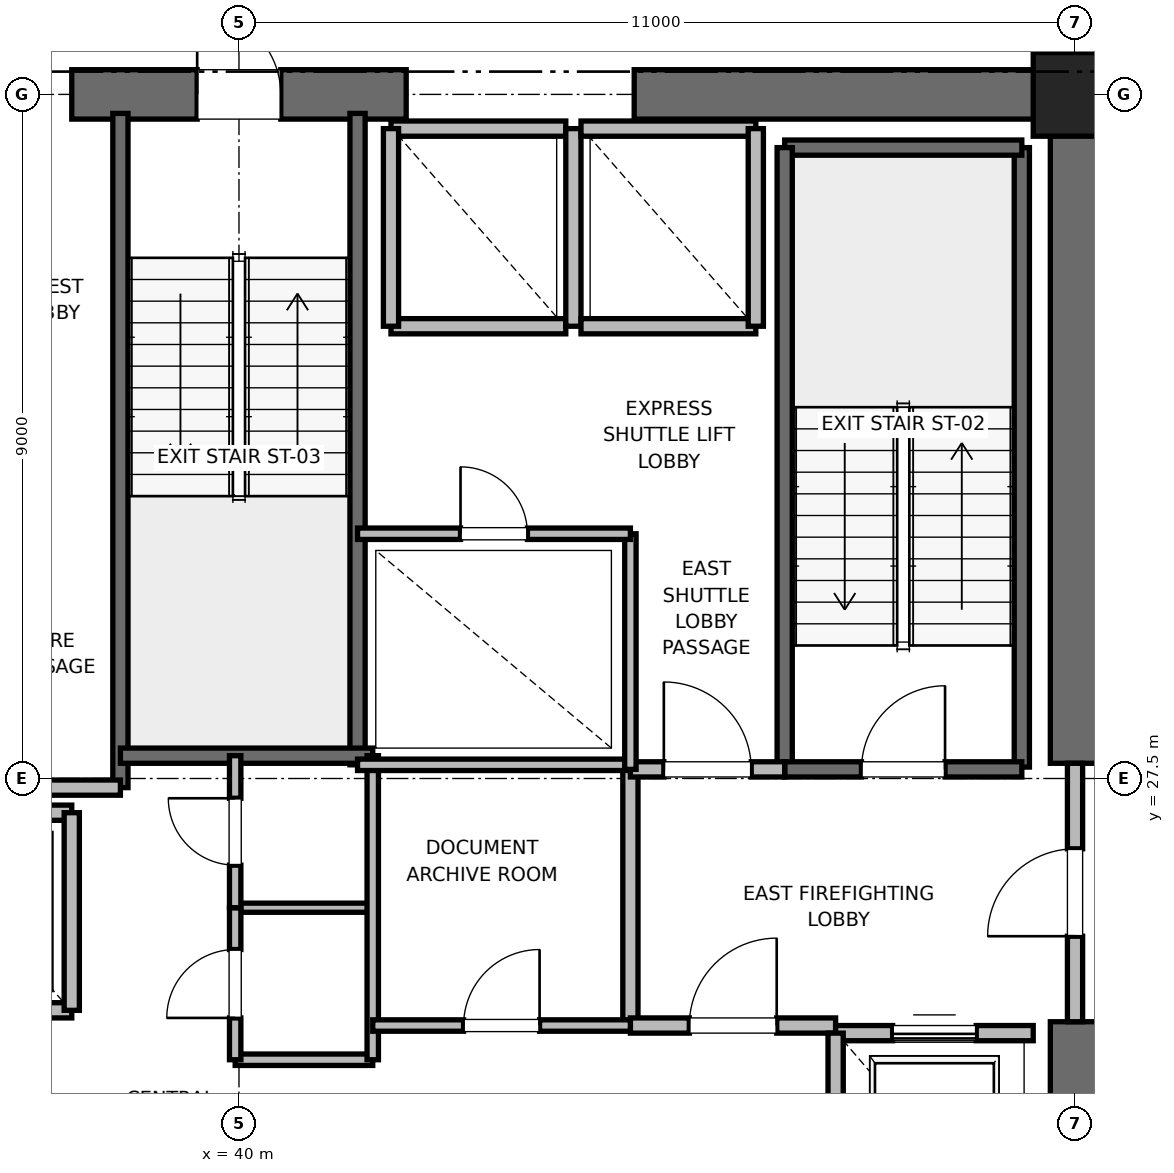
"""IFC4 building model, lengths in metres.
Left out: names, types, materials, properties, quantities, classifications, styles, units other than length and angle.
Written with IfcOpenShell. Run it as: python <this file> out.ifc"""

import sys

from ifc_helpers import new_model, si_unit, direction, frame, frame_2d, origin, origin_2d, place, context, subcontext, project, spatial, rectangle, extrude, element, fill, save


model = new_model("IFC4")
c1 = context("Model", 3, precision=1e-05, world=origin(), true_north=direction((0.0, 1.0)))
c2 = subcontext(c1, "Body", "Model", "MODEL_VIEW")
j1 = project(units=[si_unit("LENGTHUNIT", "METRE"), si_unit("PLANEANGLEUNIT", "RADIAN")], contexts=[c1])
p1 = place(None, origin())
s1 = spatial("IfcSite", under=j1, at=p1, CompositionType="ELEMENT")
p2 = place(p1, origin())
s2 = spatial("IfcBuilding", under=s1, at=p2, CompositionType="ELEMENT")
p3 = place(p2, frame((0.0, 0.0, 31.6)))
s3 = spatial("IfcBuildingStorey", under=s2, at=p3, CompositionType="ELEMENT", Elevation=31.6)
p4 = place(p3, frame((51.0, 36.5, 0.0), z_axis=(0.0, 0.0, 1.0), x_axis=(1.0, 0.0, 0.0)))
e1 = element("IfcColumn", 1, at=p4, inside=s3, PredefinedType="PILASTER", context=c2, shape_type="SweptSolid", body=[
    extrude(rectangle(XDim=1.1, YDim=1.1, at=origin_2d()), origin(), (0.0, 0.0, 1.0), 4.0),
])
p5 = place(p3, frame((37.8, 36.5, 0.0), z_axis=(0.0, 0.0, 1.0), x_axis=(1.0, 0.0, 0.0)))
e2 = element("IfcWall", 2, at=p5, inside=s3, PredefinedType="SHEAR", context=c2, shape_type="SweptSolid", body=[
    extrude(rectangle(XDim=4.4, YDim=0.65, at=frame_2d((2.2, 0.0))), origin(), (0.0, 0.0, 1.0), 3.76),
])
p6 = place(p5, frame((1.65, 0.0, 0.0)))
e3 = element("IfcOpeningElement", 3, at=p6, cuts=e2, PredefinedType="OPENING", context=c2, shape_type="SweptSolid", body=[
    extrude(rectangle(XDim=1.1, YDim=2.15, at=frame_2d((0.55, 1.075))), frame((0.0, 0.325, 0.0), z_axis=(0.0, -1.0, 0.0), x_axis=(1.0, 0.0, 0.0)), (0.0, 0.0, 1.0), 0.65),
])
for number, where, z_axis, x_axis in (
    (4, (45.2, 36.5, 0.0), (0.0, 0.0, 1.0), (1.0, 0.0, 0.0)),
    (5, (51.0, 18.5, 0.0), (0.0, 0.0, 1.0), (0.0, 1.0, 0.0)),
):
    element("IfcWall", number, at=place(p3, frame(where, z_axis=z_axis, x_axis=x_axis)), inside=s3, PredefinedType="SHEAR", context=c2, shape_type="SweptSolid", body=[
        extrude(rectangle(XDim=5.8, YDim=0.65, at=frame_2d((2.9, 0.0))), origin(), (0.0, 0.0, 1.0), 3.76),
    ])
p7 = place(p3, frame((51.0, 27.7, 0.0), z_axis=(0.0, 0.0, 1.0), x_axis=(0.0, 1.0, 0.0)))
e6 = element("IfcWall", 6, at=p7, inside=s3, PredefinedType="SHEAR", context=c2, shape_type="SweptSolid", body=[
    extrude(rectangle(XDim=8.8, YDim=0.65, at=frame_2d((4.4, 0.0))), origin(), (0.0, 0.0, 1.0), 3.76),
])
p8 = place(p3, frame((50.3, 27.65, 0.0), z_axis=(0.0, 0.0, 1.0), x_axis=(0.0, 1.0, 0.0)))
e7 = element("IfcWall", 7, at=p8, inside=s3, PredefinedType="SOLIDWALL", context=c2, shape_type="SweptSolid", body=[
    extrude(rectangle(XDim=8.15, YDim=0.2, at=frame_2d((4.075, 0.0))), origin(), (0.0, 0.0, 1.0), 3.76),
])
p9 = place(p3, frame((47.18, 35.8, 0.0), z_axis=(0.0, 0.0, 1.0), x_axis=(1.0, 0.0, 0.0)))
e8 = element("IfcWall", 8, at=p9, inside=s3, PredefinedType="SOLIDWALL", context=c2, shape_type="SweptSolid", body=[
    extrude(rectangle(XDim=3.12, YDim=0.2, at=frame_2d((1.56, 0.0))), origin(), (0.0, 0.0, 1.0), 3.76),
])
p10 = place(p3, frame((47.18, 27.62, 0.0), z_axis=(0.0, 0.0, 1.0), x_axis=(0.0, 1.0, 0.0)))
e9 = element("IfcWall", 9, at=p10, inside=s3, PredefinedType="SOLIDWALL", context=c2, shape_type="SweptSolid", body=[
    extrude(rectangle(XDim=8.18, YDim=0.2, at=frame_2d((4.09, 0.0))), origin(), (0.0, 0.0, 1.0), 3.76),
])
p11 = place(p3, frame((47.18, 27.62, 0.0), z_axis=(0.0, 0.0, 1.0), x_axis=(1.0, 0.0, 0.0)))
e10 = element("IfcWall", 10, at=p11, inside=s3, PredefinedType="SOLIDWALL", context=c2, shape_type="SweptSolid", body=[
    extrude(rectangle(XDim=3.12, YDim=0.2, at=frame_2d((1.56, 0.0))), origin(), (0.0, 0.0, 1.0), 3.76),
])
p12 = place(p11, frame((1.01, 0.0, 0.0)))
e11 = element("IfcOpeningElement", 11, at=p12, cuts=e10, PredefinedType="OPENING", context=c2, shape_type="SweptSolid", body=[
    extrude(rectangle(XDim=1.1, YDim=2.15, at=frame_2d((0.55, 1.075))), frame((0.0, 0.1, 0.0), z_axis=(0.0, -1.0, 0.0), x_axis=(1.0, 0.0, 0.0)), (0.0, 0.0, 1.0), 0.2),
])
p13 = place(p3, frame((38.44, 27.38, 0.0), z_axis=(0.0, 0.0, 1.0), x_axis=(0.0, 1.0, 0.0)))
e12 = element("IfcWall", 12, at=p13, inside=s3, PredefinedType="SOLIDWALL", context=c2, shape_type="SweptSolid", body=[
    extrude(rectangle(XDim=8.87, YDim=0.2, at=frame_2d((4.435, 0.0))), origin(), (0.0, 0.0, 1.0), 3.76),
])
p14 = place(p3, frame((41.56, 27.68, 0.0), z_axis=(0.0, 0.0, 1.0), x_axis=(0.0, 1.0, 0.0)))
e13 = element("IfcWall", 13, at=p14, inside=s3, PredefinedType="SOLIDWALL", context=c2, shape_type="SweptSolid", body=[
    extrude(rectangle(XDim=8.57, YDim=0.2, at=frame_2d((4.285, 0.0))), origin(), (0.0, 0.0, 1.0), 3.76),
])
p15 = place(p3, frame((38.44, 27.8, 0.0), z_axis=(0.0, 0.0, 1.0), x_axis=(1.0, 0.0, 0.0)))
e14 = element("IfcWall", 14, at=p15, inside=s3, PredefinedType="SOLIDWALL", context=c2, shape_type="SweptSolid", body=[
    extrude(rectangle(XDim=3.32, YDim=0.2, at=frame_2d((1.66, 0.0))), origin(), (0.0, 0.0, 1.0), 3.76),
])
p16 = place(p3, frame((32.82, 27.38, 0.0), z_axis=(0.0, 0.0, 1.0), x_axis=(1.0, 0.0, 0.0)))
e15 = element("IfcWall", 15, at=p16, inside=s3, PredefinedType="PARTITIONING", context=c2, shape_type="SweptSolid", body=[
    extrude(rectangle(XDim=5.62, YDim=0.2, at=frame_2d((2.81, 0.0))), origin(), (0.0, 0.0, 1.0), 3.76),
])
p17 = place(p3, frame((45.15, 24.25, 0.0), z_axis=(0.0, 0.0, 1.0), x_axis=(0.0, 1.0, 0.0)))
e16 = element("IfcWall", 16, at=p17, inside=s3, PredefinedType="PARTITIONING", context=c2, shape_type="SweptSolid", body=[
    extrude(rectangle(XDim=3.37, YDim=0.2, at=frame_2d((1.685, 0.0))), origin(), (0.0, 0.0, 1.0), 3.76),
])
p18 = place(p3, frame((45.15, 24.25, 0.0), z_axis=(0.0, 0.0, 1.0), x_axis=(1.0, 0.0, 0.0)))
e17 = element("IfcWall", 17, at=p18, inside=s3, PredefinedType="PARTITIONING", context=c2, shape_type="SweptSolid", body=[
    extrude(rectangle(XDim=2.7, YDim=0.2, at=frame_2d((1.35, 0.0))), origin(), (0.0, 0.0, 1.0), 3.76),
])
p19 = place(p18, frame((0.775, 0.0, 0.0)))
e18 = element("IfcOpeningElement", 18, at=p19, cuts=e17, PredefinedType="OPENING", context=c2, shape_type="SweptSolid", body=[
    extrude(rectangle(XDim=1.15, YDim=2.2, at=frame_2d((0.575, 1.1))), frame((0.0, 0.1, 0.0), z_axis=(0.0, -1.0, 0.0), x_axis=(1.0, 0.0, 0.0)), (0.0, 0.0, 1.0), 0.2),
])
p20 = place(p3, frame((45.15, 27.62, 0.0), z_axis=(0.0, 0.0, 1.0), x_axis=(1.0, 0.0, 0.0)))
e19 = element("IfcWall", 19, at=p20, inside=s3, PredefinedType="PARTITIONING", context=c2, shape_type="SweptSolid", body=[
    extrude(rectangle(XDim=2.03, YDim=0.2, at=frame_2d((1.015, 0.0))), origin(), (0.0, 0.0, 1.0), 3.76),
])
p21 = place(p20, frame((0.44, 0.0, 0.0)))
e20 = element("IfcOpeningElement", 20, at=p21, cuts=e19, PredefinedType="OPENING", context=c2, shape_type="SweptSolid", body=[
    extrude(rectangle(XDim=1.15, YDim=2.2, at=frame_2d((0.575, 1.1))), frame((0.0, 0.1, 0.0), z_axis=(0.0, -1.0, 0.0), x_axis=(1.0, 0.0, 0.0)), (0.0, 0.0, 1.0), 0.2),
])
p22 = place(p3, frame((51.0, 24.3, 0.0), z_axis=(0.0, 0.0, 1.0), x_axis=(0.0, 1.0, 0.0)))
e21 = element("IfcWall", 21, at=p22, inside=s3, PredefinedType="PARTITIONING", context=c2, shape_type="SweptSolid", body=[
    extrude(rectangle(XDim=3.4, YDim=0.2, at=frame_2d((1.7, 0.0))), origin(), (0.0, 0.0, 1.0), 2.54),
])
p23 = place(p22, frame((1.125, 0.0, 0.0)))
e22 = element("IfcOpeningElement", 22, at=p23, cuts=e21, PredefinedType="OPENING", context=c2, shape_type="SweptSolid", body=[
    extrude(rectangle(XDim=1.15, YDim=2.2, at=frame_2d((0.575, 1.1))), frame((0.0, 0.1, 0.0), z_axis=(0.0, -1.0, 0.0), x_axis=(1.0, 0.0, 0.0)), (0.0, 0.0, 1.0), 0.2),
])
p24 = place(p3, frame((50.45, 24.15, 0.0), z_axis=(0.0, 0.0, 1.0), x_axis=(-1.0, 0.0, 0.0)))
e23 = element("IfcWall", 23, at=p24, inside=s3, PredefinedType="SOLIDWALL", context=c2, shape_type="SweptSolid", body=[
    extrude(rectangle(XDim=2.6, YDim=0.2, at=frame_2d((1.3, 0.0))), origin(), (0.0, 0.0, 1.0), 2.54),
])
p25 = place(p24, frame((0.75, 0.0, 0.0)))
e24 = element("IfcOpeningElement", 24, at=p25, cuts=e23, PredefinedType="OPENING", context=c2, shape_type="SweptSolid", body=[
    extrude(rectangle(XDim=1.1, YDim=2.2, at=frame_2d((0.55, 1.1))), frame((0.0, 0.1, 0.0), z_axis=(0.0, -1.0, 0.0), x_axis=(1.0, 0.0, 0.0)), (0.0, 0.0, 1.0), 0.2),
])
p26 = place(p3, frame((47.85, 24.15, 0.0), z_axis=(0.0, 0.0, 1.0), x_axis=(0.0, -1.0, 0.0)))
e25 = element("IfcWall", 25, at=p26, inside=s3, PredefinedType="SOLIDWALL", context=c2, shape_type="SweptSolid", body=[
    extrude(rectangle(XDim=3.0, YDim=0.2, at=frame_2d((1.5, 0.0))), origin(), (0.0, 0.0, 1.0), 3.76),
])
p27 = place(p3, frame((35.5, 24.45, 0.0), z_axis=(0.0, 0.0, 1.0), x_axis=(1.0, 0.0, 0.0)))
e26 = element("IfcWall", 26, at=p27, inside=s3, PredefinedType="SOLIDWALL", context=c2, shape_type="SweptSolid", body=[
    extrude(rectangle(XDim=2.3, YDim=0.2, at=frame_2d((1.15, 0.0))), origin(), (0.0, 0.0, 1.0), 3.76),
])
p28 = place(p27, frame((0.6, 0.0, 0.0)))
e27 = element("IfcOpeningElement", 27, at=p28, cuts=e26, PredefinedType="OPENING", context=c2, shape_type="SweptSolid", body=[
    extrude(rectangle(XDim=1.1, YDim=2.2, at=frame_2d((0.55, 1.1))), frame((0.0, 0.1, 0.0), z_axis=(0.0, -1.0, 0.0), x_axis=(1.0, 0.0, 0.0)), (0.0, 0.0, 1.0), 0.2),
])
p29 = place(p3, frame((37.8, 27.05, 0.0), z_axis=(0.0, 0.0, 1.0), x_axis=(-1.0, 0.0, 0.0)))
e28 = element("IfcWall", 28, at=p29, inside=s3, PredefinedType="SOLIDWALL", context=c2, shape_type="SweptSolid", body=[
    extrude(rectangle(XDim=2.3, YDim=0.2, at=frame_2d((1.15, 0.0))), origin(), (0.0, 0.0, 1.0), 3.76),
])
p30 = place(p3, frame((37.8, 24.45, 0.0), z_axis=(0.0, 0.0, 1.0), x_axis=(0.0, 1.0, 0.0)))
e29 = element("IfcWall", 29, at=p30, inside=s3, PredefinedType="SOLIDWALL", context=c2, shape_type="SweptSolid", body=[
    extrude(rectangle(XDim=2.6, YDim=0.2, at=frame_2d((1.3, 0.0))), origin(), (0.0, 0.0, 1.0), 3.76),
])
p31 = place(p3, frame((42.0, 33.45, 0.0), z_axis=(0.0, 0.0, 1.0), x_axis=(1.0, 0.0, 0.0)))
e30 = element("IfcWall", 30, at=p31, inside=s3, PredefinedType="SOLIDWALL", context=c2, shape_type="SweptSolid", body=[
    extrude(rectangle(XDim=2.3, YDim=0.2, at=frame_2d((1.15, 0.0))), origin(), (0.0, 0.0, 1.0), 3.76),
])
p32 = place(p3, frame((44.3, 36.05, 0.0), z_axis=(0.0, 0.0, 1.0), x_axis=(-1.0, 0.0, 0.0)))
e31 = element("IfcWall", 31, at=p32, inside=s3, PredefinedType="SOLIDWALL", context=c2, shape_type="SweptSolid", body=[
    extrude(rectangle(XDim=2.3, YDim=0.2, at=frame_2d((1.15, 0.0))), origin(), (0.0, 0.0, 1.0), 2.54),
])
for number, where, z_axis, x_axis in (
    (32, (42.0, 36.05, 0.0), (0.0, 0.0, 1.0), (0.0, -1.0, 0.0)),
    (33, (44.4, 33.45, 0.0), (0.0, 0.0, 1.0), (0.0, 1.0, 0.0)),
):
    element("IfcWall", number, at=place(p3, frame(where, z_axis=z_axis, x_axis=x_axis)), inside=s3, PredefinedType="SOLIDWALL", context=c2, shape_type="SweptSolid", body=[
        extrude(rectangle(XDim=2.6, YDim=0.2, at=frame_2d((1.3, 0.0))), origin(), (0.0, 0.0, 1.0), 2.54),
    ])
p33 = place(p3, frame((44.5, 33.45, 0.0), z_axis=(0.0, 0.0, 1.0), x_axis=(1.0, 0.0, 0.0)))
e34 = element("IfcWall", 34, at=p33, inside=s3, PredefinedType="SOLIDWALL", context=c2, shape_type="SweptSolid", body=[
    extrude(rectangle(XDim=2.3, YDim=0.2, at=frame_2d((1.15, 0.0))), origin(), (0.0, 0.0, 1.0), 3.76),
])
p34 = place(p3, frame((46.8, 36.05, 0.0), z_axis=(0.0, 0.0, 1.0), x_axis=(-1.0, 0.0, 0.0)))
e35 = element("IfcWall", 35, at=p34, inside=s3, PredefinedType="SOLIDWALL", context=c2, shape_type="SweptSolid", body=[
    extrude(rectangle(XDim=2.3, YDim=0.2, at=frame_2d((1.15, 0.0))), origin(), (0.0, 0.0, 1.0), 2.54),
])
p35 = place(p3, frame((46.8, 33.45, 0.0), z_axis=(0.0, 0.0, 1.0), x_axis=(0.0, 1.0, 0.0)))
e36 = element("IfcWall", 36, at=p35, inside=s3, PredefinedType="SOLIDWALL", context=c2, shape_type="SweptSolid", body=[
    extrude(rectangle(XDim=2.6, YDim=0.2, at=frame_2d((1.3, 0.0))), origin(), (0.0, 0.0, 1.0), 3.76),
])
p36 = place(p3, frame((39.95, 23.8, 0.0), z_axis=(0.0, 0.0, 1.0), x_axis=(1.0, 0.0, 0.0)))
e37 = element("IfcWall", 37, at=p36, inside=s3, PredefinedType="PARTITIONING", context=c2, shape_type="SweptSolid", body=[
    extrude(rectangle(XDim=1.81, YDim=0.15, at=frame_2d((0.905, 0.0))), origin(), (0.0, 0.0, 1.0), 2.85),
])
p37 = place(p3, frame((39.95, 25.8, 0.0), z_axis=(0.0, 0.0, 1.0), x_axis=(1.0, 0.0, 0.0)))
e38 = element("IfcWall", 38, at=p37, inside=s3, PredefinedType="PARTITIONING", context=c2, shape_type="SweptSolid", body=[
    extrude(rectangle(XDim=1.81, YDim=0.12, at=frame_2d((0.905, 0.0))), origin(), (0.0, 0.0, 1.0), 2.85),
])
p38 = place(p3, frame((41.76, 23.8, 0.0), z_axis=(0.0, 0.0, 1.0), x_axis=(0.0, 1.0, 0.0)))
e39 = element("IfcWall", 39, at=p38, inside=s3, PredefinedType="PARTITIONING", context=c2, shape_type="SweptSolid", body=[
    extrude(rectangle(XDim=4.0, YDim=0.15, at=frame_2d((2.0, 0.0))), origin(), (0.0, 0.0, 1.0), 2.85),
])
p39 = place(p3, frame((39.95, 23.8, 0.0), z_axis=(0.0, 0.0, 1.0), x_axis=(0.0, 1.0, 0.0)))
e40 = element("IfcWall", 40, at=p39, inside=s3, PredefinedType="PARTITIONING", context=c2, shape_type="SweptSolid", body=[
    extrude(rectangle(XDim=2.0, YDim=0.15, at=frame_2d((1.0, 0.0))), origin(), (0.0, 0.0, 1.0), 2.85),
])
p40 = place(p39, frame((0.55, 0.0, 0.0)))
e41 = element("IfcOpeningElement", 41, at=p40, cuts=e40, PredefinedType="OPENING", context=c2, shape_type="SweptSolid", body=[
    extrude(rectangle(XDim=0.9, YDim=2.1, at=frame_2d((0.45, 1.05))), frame((0.0, 0.075, 0.0), z_axis=(0.0, -1.0, 0.0), x_axis=(1.0, 0.0, 0.0)), (0.0, 0.0, 1.0), 0.15),
])
p41 = place(p3, frame((39.95, 25.8, 0.0), z_axis=(0.0, 0.0, 1.0), x_axis=(0.0, 1.0, 0.0)))
e42 = element("IfcWall", 42, at=p41, inside=s3, PredefinedType="PARTITIONING", context=c2, shape_type="SweptSolid", body=[
    extrude(rectangle(XDim=2.0, YDim=0.15, at=frame_2d((1.0, 0.0))), origin(), (0.0, 0.0, 1.0), 2.85),
])
p42 = place(p41, frame((0.56, 0.0, 0.0)))
e43 = element("IfcOpeningElement", 43, at=p42, cuts=e42, PredefinedType="OPENING", context=c2, shape_type="SweptSolid", body=[
    extrude(rectangle(XDim=0.88, YDim=2.1, at=frame_2d((0.44, 1.05))), frame((0.0, 0.075, 0.0), z_axis=(0.0, -1.0, 0.0), x_axis=(1.0, 0.0, 0.0)), (0.0, 0.0, 1.0), 0.15),
])
p43 = place(p3, frame((41.56, 27.68, 0.0), z_axis=(0.0, 0.0, 1.0), x_axis=(1.0, 0.0, 0.0)))
e44 = element("IfcWall", 44, at=p43, inside=s3, PredefinedType="PARTITIONING", context=c2, shape_type="SweptSolid", body=[
    extrude(rectangle(XDim=3.59, YDim=0.15, at=frame_2d((1.795, 0.0))), origin(), (0.0, 0.0, 1.0), 2.85),
])
p44 = place(p3, frame((41.76, 24.25, 0.0), z_axis=(0.0, 0.0, 1.0), x_axis=(1.0, 0.0, 0.0)))
e45 = element("IfcWall", 45, at=p44, inside=s3, PredefinedType="PARTITIONING", context=c2, shape_type="SweptSolid", body=[
    extrude(rectangle(XDim=3.39, YDim=0.15, at=frame_2d((1.695, 0.0))), origin(), (0.0, 0.0, 1.0), 2.85),
])
p45 = place(p44, frame((1.195, 0.0, 0.0)))
e46 = element("IfcOpeningElement", 46, at=p45, cuts=e45, PredefinedType="OPENING", context=c2, shape_type="SweptSolid", body=[
    extrude(rectangle(XDim=1.0, YDim=2.15, at=frame_2d((0.5, 1.075))), frame((0.0, 0.075, 0.0), z_axis=(0.0, -1.0, 0.0), x_axis=(1.0, 0.0, 0.0)), (0.0, 0.0, 1.0), 0.15),
])
p46 = place(p3, frame((45.15, 27.62, 0.0), z_axis=(0.0, 0.0, 1.0), x_axis=(0.0, 1.0, 0.0)))
e47 = element("IfcWall", 47, at=p46, inside=s3, PredefinedType="PARTITIONING", context=c2, shape_type="SweptSolid", body=[
    extrude(rectangle(XDim=3.1, YDim=0.15, at=frame_2d((1.55, 0.0))), origin(), (0.0, 0.0, 1.0), 2.85),
])
p47 = place(p3, frame((41.56, 30.72, 0.0), z_axis=(0.0, 0.0, 1.0), x_axis=(1.0, 0.0, 0.0)))
e48 = element("IfcWall", 48, at=p47, inside=s3, PredefinedType="PARTITIONING", context=c2, shape_type="SweptSolid", body=[
    extrude(rectangle(XDim=3.59, YDim=0.15, at=frame_2d((1.795, 0.0))), origin(), (0.0, 0.0, 1.0), 2.85),
])
p48 = place(p47, frame((1.355, 0.0, 0.0)))
e49 = element("IfcOpeningElement", 49, at=p48, cuts=e48, PredefinedType="OPENING", context=c2, shape_type="SweptSolid", body=[
    extrude(rectangle(XDim=0.88, YDim=2.1, at=frame_2d((0.44, 1.05))), frame((0.0, 0.075, 0.0), z_axis=(0.0, -1.0, 0.0), x_axis=(1.0, 0.0, 0.0)), (0.0, 0.0, 1.0), 0.15),
])
p49 = place(p12, origin())
e50 = element("IfcDoor", 50, at=p49, inside=s3, OperationType="SINGLE_SWING_RIGHT", PredefinedType="DOOR", context=c2, shape_type="SweptSolid", body=[
    extrude(rectangle(XDim=1.1, YDim=2.15, at=frame_2d((0.55, 1.075))), frame((0.0, 0.025, 0.0), z_axis=(0.0, -1.0, 0.0), x_axis=(1.0, 0.0, 0.0)), (0.0, 0.0, 1.0), 0.05),
])
fill(e11, e50)
p50 = place(p6, origin())
e51 = element("IfcDoor", 51, at=p50, inside=s3, OperationType="SINGLE_SWING_LEFT", PredefinedType="DOOR", context=c2, shape_type="SweptSolid", body=[
    extrude(rectangle(XDim=1.1, YDim=2.15, at=frame_2d((0.55, 1.075))), frame((0.0, 0.025, 0.0), z_axis=(0.0, -1.0, 0.0), x_axis=(1.0, 0.0, 0.0)), (0.0, 0.0, 1.0), 0.05),
])
fill(e3, e51)
p51 = place(p19, origin())
e52 = element("IfcDoor", 52, at=p51, inside=s3, OperationType="SINGLE_SWING_RIGHT", PredefinedType="DOOR", context=c2, shape_type="SweptSolid", body=[
    extrude(rectangle(XDim=1.15, YDim=2.2, at=frame_2d((0.575, 1.1))), frame((0.0, 0.025, 0.0), z_axis=(0.0, -1.0, 0.0), x_axis=(1.0, 0.0, 0.0)), (0.0, 0.0, 1.0), 0.05),
])
fill(e18, e52)
p52 = place(p21, origin())
e53 = element("IfcDoor", 53, at=p52, inside=s3, OperationType="SINGLE_SWING_LEFT", PredefinedType="DOOR", context=c2, shape_type="SweptSolid", body=[
    extrude(rectangle(XDim=1.15, YDim=2.2, at=frame_2d((0.575, 1.1))), frame((0.0, 0.025, 0.0), z_axis=(0.0, -1.0, 0.0), x_axis=(1.0, 0.0, 0.0)), (0.0, 0.0, 1.0), 0.05),
])
fill(e20, e53)
p53 = place(p23, origin())
e54 = element("IfcDoor", 54, at=p53, inside=s3, OperationType="SINGLE_SWING_LEFT", PredefinedType="DOOR", context=c2, shape_type="SweptSolid", body=[
    extrude(rectangle(XDim=1.15, YDim=2.2, at=frame_2d((0.575, 1.1))), frame((0.0, 0.025, 0.0), z_axis=(0.0, -1.0, 0.0), x_axis=(1.0, 0.0, 0.0)), (0.0, 0.0, 1.0), 0.05),
])
fill(e22, e54)
p54 = place(p25, origin())
e55 = element("IfcDoor", 55, at=p54, inside=s3, OperationType="SLIDING_TO_RIGHT", PredefinedType="DOOR", context=c2, shape_type="SweptSolid", body=[
    extrude(rectangle(XDim=1.1, YDim=2.2, at=frame_2d((0.55, 1.1))), frame((0.0, 0.025, 0.0), z_axis=(0.0, -1.0, 0.0), x_axis=(1.0, 0.0, 0.0)), (0.0, 0.0, 1.0), 0.05),
])
fill(e24, e55)
p55 = place(p40, origin())
e56 = element("IfcDoor", 56, at=p55, inside=s3, OperationType="SINGLE_SWING_LEFT", PredefinedType="DOOR", context=c2, shape_type="SweptSolid", body=[
    extrude(rectangle(XDim=0.9, YDim=2.1, at=frame_2d((0.45, 1.05))), frame((0.0, 0.025, 0.0), z_axis=(0.0, -1.0, 0.0), x_axis=(1.0, 0.0, 0.0)), (0.0, 0.0, 1.0), 0.05),
])
fill(e41, e56)
p56 = place(p42, origin())
e57 = element("IfcDoor", 57, at=p56, inside=s3, OperationType="SINGLE_SWING_RIGHT", PredefinedType="DOOR", context=c2, shape_type="SweptSolid", body=[
    extrude(rectangle(XDim=0.88, YDim=2.1, at=frame_2d((0.44, 1.05))), frame((0.0, 0.025, 0.0), z_axis=(0.0, -1.0, 0.0), x_axis=(1.0, 0.0, 0.0)), (0.0, 0.0, 1.0), 0.05),
])
fill(e43, e57)
p57 = place(p45, origin())
e58 = element("IfcDoor", 58, at=p57, inside=s3, OperationType="SINGLE_SWING_RIGHT", PredefinedType="DOOR", context=c2, shape_type="SweptSolid", body=[
    extrude(rectangle(XDim=1.0, YDim=2.15, at=frame_2d((0.5, 1.075))), frame((0.0, 0.025, 0.0), z_axis=(0.0, -1.0, 0.0), x_axis=(1.0, 0.0, 0.0)), (0.0, 0.0, 1.0), 0.05),
])
fill(e46, e58)
p58 = place(p48, origin())
e59 = element("IfcDoor", 59, at=p58, inside=s3, OperationType="SINGLE_SWING_LEFT", PredefinedType="DOOR", context=c2, shape_type="SweptSolid", body=[
    extrude(rectangle(XDim=0.88, YDim=2.1, at=frame_2d((0.44, 1.05))), frame((0.0, 0.025, 0.0), z_axis=(0.0, -1.0, 0.0), x_axis=(1.0, 0.0, 0.0)), (0.0, 0.0, 1.0), 0.05),
])
fill(e49, e59)
save(model, sys.argv[1])
